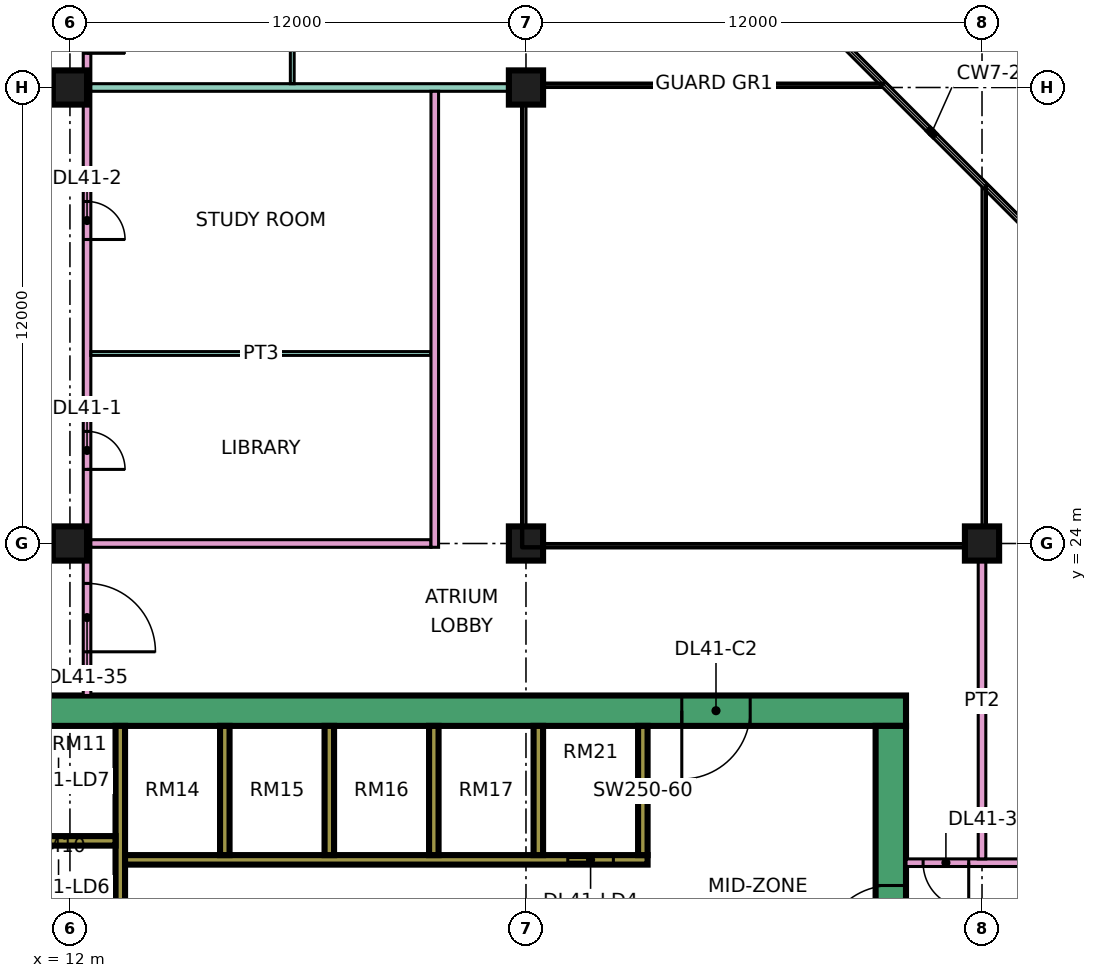
"""IFC4 building model, lengths in metres.
Left out: names, types, materials, properties, quantities, classifications, styles, units other than length and angle.
Written with IfcOpenShell. Run it as: python <this file> out.ifc"""

import sys

from ifc_helpers import new_model, si_unit, direction, frame, frame_2d, origin, origin_2d, place, context, subcontext, project, spatial, rectangle, extrude, element, fill, save


model = new_model("IFC4")
c1 = context("Model", 3, precision=1e-05, world=origin(), true_north=direction((0.0, 1.0)))
c2 = subcontext(c1, "Body", "Model", "MODEL_VIEW")
j1 = project(units=[si_unit("LENGTHUNIT", "METRE"), si_unit("PLANEANGLEUNIT", "RADIAN")], contexts=[c1])
p1 = place(None, origin())
s1 = spatial("IfcSite", under=j1, at=p1, CompositionType="ELEMENT")
p2 = place(p1, origin())
s2 = spatial("IfcBuilding", under=s1, at=p2, CompositionType="ELEMENT")
p3 = place(p2, frame((0.0, 0.0, 179.9)))
s3 = spatial("IfcBuildingStorey", under=s2, at=p3, CompositionType="ELEMENT", Elevation=179.9)
for number, where, z_axis, x_axis in (
    (1, (12.0, 24.0, 0.0), (0.0, 0.0, 1.0), (1.0, 0.0, 0.0)),
    (2, (12.0, 36.0, 0.0), (0.0, 0.0, 1.0), (1.0, 0.0, 0.0)),
    (3, (24.0, 24.0, 0.0), (0.0, 0.0, 1.0), (1.0, 0.0, 0.0)),
    (4, (24.0, 36.0, 0.0), (0.0, 0.0, 1.0), (1.0, 0.0, 0.0)),
    (5, (36.0, 24.0, 0.0), (0.0, 0.0, 1.0), (1.0, 0.0, 0.0)),
):
    element("IfcColumn", number, at=place(p3, frame(where, z_axis=z_axis, x_axis=x_axis)), inside=s3, PredefinedType="COLUMN", context=c2, shape_type="SweptSolid", body=[
        extrude(rectangle(XDim=0.9, YDim=0.9, at=origin_2d()), origin(), (0.0, 0.0, 1.0), 3.75),
    ])
p4 = place(p3, frame((9.0, 19.6, 0.0), z_axis=(0.0, 0.0, 1.0), x_axis=(1.0, 0.0, 0.0)))
e6 = element("IfcWall", 6, at=p4, inside=s3, PredefinedType="SHEAR", context=c2, shape_type="SweptSolid", body=[
    extrude(rectangle(XDim=25.0, YDim=0.8, at=frame_2d((12.5, 0.0))), origin(), (0.0, 0.0, 1.0), 3.75),
])
p5 = place(p4, frame((19.1, 0.0, 0.0)))
e7 = element("IfcOpeningElement", 7, at=p5, cuts=e6, PredefinedType="OPENING", context=c2, shape_type="SweptSolid", body=[
    extrude(rectangle(XDim=1.8, YDim=2.4, at=frame_2d((0.9, 1.2))), frame((0.0, 0.41, 0.0), z_axis=(0.0, -1.0, 0.0), x_axis=(1.0, 0.0, 0.0)), (0.0, 0.0, 1.0), 0.82),
])
p6 = place(p3, frame((33.6, 7.8, 0.0), z_axis=(0.0, 0.0, 1.0), x_axis=(0.0, 1.0, 0.0)))
e8 = element("IfcWall", 8, at=p6, inside=s3, PredefinedType="SHEAR", context=c2, shape_type="SweptSolid", body=[
    extrude(rectangle(XDim=11.4, YDim=0.8, at=frame_2d((5.7, 0.0))), origin(), (0.0, 0.0, 1.0), 3.75),
])
p7 = place(p6, frame((5.4, 0.0, 0.0)))
e9 = element("IfcOpeningElement", 9, at=p7, cuts=e8, PredefinedType="OPENING", context=c2, shape_type="SweptSolid", body=[
    extrude(rectangle(XDim=1.8, YDim=2.4, at=frame_2d((0.9, 1.2))), frame((0.0, 0.41, 0.0), z_axis=(0.0, -1.0, 0.0), x_axis=(1.0, 0.0, 0.0)), (0.0, 0.0, 1.0), 0.82),
])
p8 = place(p3, frame((13.325, 7.8, 0.0), z_axis=(0.0, 0.0, 1.0), x_axis=(0.0, 1.0, 0.0)))
e10 = element("IfcWall", 10, at=p8, inside=s3, PredefinedType="SHEAR", context=c2, shape_type="SweptSolid", body=[
    extrude(rectangle(XDim=11.4, YDim=0.25, at=frame_2d((5.7, 0.0))), origin(), (0.0, 0.0, 1.0), 3.75),
])
p9 = place(p3, frame((13.45, 15.675, 0.0), z_axis=(0.0, 0.0, 1.0), x_axis=(1.0, 0.0, 0.0)))
e11 = element("IfcWall", 11, at=p9, inside=s3, PredefinedType="SHEAR", context=c2, shape_type="SweptSolid", body=[
    extrude(rectangle(XDim=13.75, YDim=0.25, at=frame_2d((6.875, 0.0))), origin(), (0.0, 0.0, 1.0), 3.75),
])
p10 = place(p9, frame((11.65, 0.0, 0.0)))
e12 = element("IfcOpeningElement", 12, at=p10, cuts=e11, PredefinedType="OPENING", context=c2, shape_type="SweptSolid", body=[
    extrude(rectangle(XDim=1.2, YDim=2.2, at=frame_2d((0.6, 1.1))), frame((0.0, 0.135, 0.0), z_axis=(0.0, -1.0, 0.0), x_axis=(1.0, 0.0, 0.0)), (0.0, 0.0, 1.0), 0.27),
])
p11 = place(p3, frame((10.2, 16.175, 0.0), z_axis=(0.0, 0.0, 1.0), x_axis=(1.0, 0.0, 0.0)))
e13 = element("IfcWall", 13, at=p11, inside=s3, PredefinedType="SHEAR", context=c2, shape_type="SweptSolid", body=[
    extrude(rectangle(XDim=3.0, YDim=0.25, at=frame_2d((1.5, 0.0))), origin(), (0.0, 0.0, 1.0), 3.75),
])
for number, where, z_axis, x_axis in (
    (14, (16.075, 15.8, 0.0), (0.0, 0.0, 1.0), (0.0, 1.0, 0.0)),
    (15, (18.825, 15.8, 0.0), (0.0, 0.0, 1.0), (0.0, 1.0, 0.0)),
    (16, (21.575, 15.8, 0.0), (0.0, 0.0, 1.0), (0.0, 1.0, 0.0)),
    (17, (24.325, 15.8, 0.0), (0.0, 0.0, 1.0), (0.0, 1.0, 0.0)),
    (18, (27.075, 15.8, 0.0), (0.0, 0.0, 1.0), (0.0, 1.0, 0.0)),
):
    element("IfcWall", number, at=place(p3, frame(where, z_axis=z_axis, x_axis=x_axis)), inside=s3, PredefinedType="SHEAR", context=c2, shape_type="SweptSolid", body=[
        extrude(rectangle(XDim=3.4, YDim=0.25, at=frame_2d((1.7, 0.0))), origin(), (0.0, 0.0, 1.0), 3.75),
    ])
p12 = place(p3, frame((12.45, 20.0, 0.0), z_axis=(0.0, 0.0, 1.0), x_axis=(0.0, 1.0, 0.0)))
e19 = element("IfcWall", 19, at=p12, inside=s3, PredefinedType="PARTITIONING", context=c2, shape_type="SweptSolid", body=[
    extrude(rectangle(XDim=42.926, YDim=0.2, at=frame_2d((21.463, 0.0))), origin(), (0.0, 0.0, 1.0), 3.35),
])
p13 = place(p12, frame((5.95, 0.0, 0.0)))
e20 = element("IfcOpeningElement", 20, at=p13, cuts=e19, PredefinedType="OPENING", context=c2, shape_type="SweptSolid", body=[
    extrude(rectangle(XDim=1.0, YDim=2.1, at=frame_2d((0.5, 1.05))), frame((0.0, 0.11, 0.0), z_axis=(0.0, -1.0, 0.0), x_axis=(1.0, 0.0, 0.0)), (0.0, 0.0, 1.0), 0.22),
])
p14 = place(p12, frame((12.0, 0.0, 0.0)))
e21 = element("IfcOpeningElement", 21, at=p14, cuts=e19, PredefinedType="OPENING", context=c2, shape_type="SweptSolid", body=[
    extrude(rectangle(XDim=1.0, YDim=2.1, at=frame_2d((0.5, 1.05))), frame((0.0, 0.11, 0.0), z_axis=(0.0, -1.0, 0.0), x_axis=(1.0, 0.0, 0.0)), (0.0, 0.0, 1.0), 0.22),
])
p15 = place(p12, frame((16.9, 0.0, 0.0)))
e22 = element("IfcOpeningElement", 22, at=p15, cuts=e19, PredefinedType="OPENING", context=c2, shape_type="SweptSolid", body=[
    extrude(rectangle(XDim=1.0, YDim=2.1, at=frame_2d((0.5, 1.05))), frame((0.0, 0.11, 0.0), z_axis=(0.0, -1.0, 0.0), x_axis=(1.0, 0.0, 0.0)), (0.0, 0.0, 1.0), 0.22),
])
p16 = place(p12, frame((34.9, 0.0, 0.0)))
e23 = element("IfcOpeningElement", 23, at=p16, cuts=e19, PredefinedType="OPENING", context=c2, shape_type="SweptSolid", body=[
    extrude(rectangle(XDim=1.0, YDim=2.1, at=frame_2d((0.5, 1.05))), frame((0.0, 0.11, 0.0), z_axis=(0.0, -1.0, 0.0), x_axis=(1.0, 0.0, 0.0)), (0.0, 0.0, 1.0), 0.22),
])
p17 = place(p12, frame((1.15, 0.0, 0.0)))
e24 = element("IfcOpeningElement", 24, at=p17, cuts=e19, PredefinedType="OPENING", context=c2, shape_type="SweptSolid", body=[
    extrude(rectangle(XDim=1.8, YDim=2.1, at=frame_2d((0.9, 1.05))), frame((0.0, 0.11, 0.0), z_axis=(0.0, -1.0, 0.0), x_axis=(1.0, 0.0, 0.0)), (0.0, 0.0, 1.0), 0.22),
])
p18 = place(p12, frame((28.6, 0.0, 0.0)))
e25 = element("IfcOpeningElement", 25, at=p18, cuts=e19, PredefinedType="OPENING", context=c2, shape_type="SweptSolid", body=[
    extrude(rectangle(XDim=1.8, YDim=2.1, at=frame_2d((0.9, 1.05))), frame((0.0, 0.11, 0.0), z_axis=(0.0, -1.0, 0.0), x_axis=(1.0, 0.0, 0.0)), (0.0, 0.0, 1.0), 0.22),
])
p19 = place(p3, frame((12.55, 24.0, 0.0), z_axis=(0.0, 0.0, 1.0), x_axis=(1.0, 0.0, 0.0)))
e26 = element("IfcWall", 26, at=p19, inside=s3, PredefinedType="PARTITIONING", context=c2, shape_type="SweptSolid", body=[
    extrude(rectangle(XDim=8.95, YDim=0.2, at=frame_2d((4.475, 0.0))), origin(), (0.0, 0.0, 1.0), 3.35),
])
p20 = place(p3, frame((12.55, 29.0, 0.0), z_axis=(0.0, 0.0, 1.0), x_axis=(1.0, 0.0, 0.0)))
e27 = element("IfcWall", 27, at=p20, inside=s3, PredefinedType="PARTITIONING", context=c2, shape_type="SweptSolid", body=[
    extrude(rectangle(XDim=8.95, YDim=0.1, at=frame_2d((4.475, 0.0))), origin(), (0.0, 0.0, 1.0), 3.35),
])
p21 = place(p3, frame((12.55, 36.0, 0.0), z_axis=(0.0, 0.0, 1.0), x_axis=(1.0, 0.0, 0.0)))
e28 = element("IfcWall", 28, at=p21, inside=s3, PredefinedType="PARTITIONING", context=c2, shape_type="SweptSolid", body=[
    extrude(rectangle(XDim=11.45, YDim=0.2, at=frame_2d((5.725, 0.0))), origin(), (0.0, 0.0, 1.0), 3.35),
])
p22 = place(p3, frame((17.85, 36.1, 0.0), z_axis=(0.0, 0.0, 1.0), x_axis=(0.0, 1.0, 0.0)))
e29 = element("IfcWall", 29, at=p22, inside=s3, PredefinedType="PARTITIONING", context=c2, shape_type="SweptSolid", body=[
    extrude(rectangle(XDim=2.85, YDim=0.1, at=frame_2d((1.425, 0.0))), origin(), (0.0, 0.0, 1.0), 3.35),
])
p23 = place(p22, frame((0.95, 0.0, 0.0)))
e30 = element("IfcOpeningElement", 30, at=p23, cuts=e29, PredefinedType="OPENING", context=c2, shape_type="SweptSolid", body=[
    extrude(rectangle(XDim=0.9, YDim=2.1, at=frame_2d((0.45, 1.05))), frame((0.0, 0.06, 0.0), z_axis=(0.0, -1.0, 0.0), x_axis=(1.0, 0.0, 0.0)), (0.0, 0.0, 1.0), 0.12),
])
p24 = place(p3, frame((21.6, 23.9, 0.0), z_axis=(0.0, 0.0, 1.0), x_axis=(0.0, 1.0, 0.0)))
e31 = element("IfcWall", 31, at=p24, inside=s3, PredefinedType="PARTITIONING", context=c2, shape_type="SweptSolid", body=[
    extrude(rectangle(XDim=12.0, YDim=0.2, at=frame_2d((6.0, 0.0))), origin(), (0.0, 0.0, 1.0), 3.35),
])
p25 = place(p3, frame((34.0, 15.6, 0.0), z_axis=(0.0, 0.0, 1.0), x_axis=(1.0, 0.0, 0.0)))
e32 = element("IfcWall", 32, at=p25, inside=s3, PredefinedType="PARTITIONING", context=c2, shape_type="SweptSolid", body=[
    extrude(rectangle(XDim=10.35, YDim=0.2, at=frame_2d((5.175, 0.0))), origin(), (0.0, 0.0, 1.0), 3.35),
])
p26 = place(p25, frame((5.6, 0.0, 0.0)))
e33 = element("IfcOpeningElement", 33, at=p26, cuts=e32, PredefinedType="OPENING", context=c2, shape_type="SweptSolid", body=[
    extrude(rectangle(XDim=1.0, YDim=2.1, at=frame_2d((0.5, 1.05))), frame((0.0, 0.11, 0.0), z_axis=(0.0, -1.0, 0.0), x_axis=(1.0, 0.0, 0.0)), (0.0, 0.0, 1.0), 0.22),
])
p27 = place(p25, frame((0.45, 0.0, 0.0)))
e34 = element("IfcOpeningElement", 34, at=p27, cuts=e32, PredefinedType="OPENING", context=c2, shape_type="SweptSolid", body=[
    extrude(rectangle(XDim=1.2, YDim=2.1, at=frame_2d((0.6, 1.05))), frame((0.0, 0.11, 0.0), z_axis=(0.0, -1.0, 0.0), x_axis=(1.0, 0.0, 0.0)), (0.0, 0.0, 1.0), 0.22),
])
p28 = place(p3, frame((36.0, 15.7, 0.0), z_axis=(0.0, 0.0, 1.0), x_axis=(0.0, 1.0, 0.0)))
e35 = element("IfcWall", 35, at=p28, inside=s3, PredefinedType="PARTITIONING", context=c2, shape_type="SweptSolid", body=[
    extrude(rectangle(XDim=8.3, YDim=0.2, at=frame_2d((4.15, 0.0))), origin(), (0.0, 0.0, 1.0), 3.35),
])
p29 = place(p10, origin())
e36 = element("IfcDoor", 36, at=p29, inside=s3, OperationType="DOUBLE_DOOR_SLIDING", PredefinedType="DOOR", context=c2, shape_type="SweptSolid", body=[
    extrude(rectangle(XDim=1.2, YDim=2.2, at=frame_2d((0.6, 1.1))), frame((0.0, 0.025, 0.0), z_axis=(0.0, -1.0, 0.0), x_axis=(1.0, 0.0, 0.0)), (0.0, 0.0, 1.0), 0.05),
])
fill(e12, e36)
p30 = place(p7, origin())
e37 = element("IfcDoor", 37, at=p30, inside=s3, OperationType="DOUBLE_DOOR_SINGLE_SWING", PredefinedType="DOOR", context=c2, shape_type="SweptSolid", body=[
    extrude(rectangle(XDim=1.8, YDim=2.4, at=frame_2d((0.9, 1.2))), frame((0.0, 0.025, 0.0), z_axis=(0.0, -1.0, 0.0), x_axis=(1.0, 0.0, 0.0)), (0.0, 0.0, 1.0), 0.05),
])
fill(e9, e37)
p31 = place(p5, frame((1.8, 0.0, 0.0), z_axis=(0.0, 0.0, 1.0), x_axis=(-1.0, 0.0, 0.0)))
e38 = element("IfcDoor", 38, at=p31, inside=s3, OperationType="DOUBLE_DOOR_SINGLE_SWING", PredefinedType="DOOR", context=c2, shape_type="SweptSolid", body=[
    extrude(rectangle(XDim=1.8, YDim=2.4, at=frame_2d((0.9, 1.2))), frame((0.0, 0.025, 0.0), z_axis=(0.0, -1.0, 0.0), x_axis=(1.0, 0.0, 0.0)), (0.0, 0.0, 1.0), 0.05),
])
fill(e7, e38)
p32 = place(p13, frame((1.0, 0.0, 0.0), z_axis=(0.0, 0.0, 1.0), x_axis=(-1.0, 0.0, 0.0)))
e39 = element("IfcDoor", 39, at=p32, inside=s3, OperationType="SINGLE_SWING_LEFT", PredefinedType="DOOR", context=c2, shape_type="SweptSolid", body=[
    extrude(rectangle(XDim=1.0, YDim=2.1, at=frame_2d((0.5, 1.05))), frame((0.0, 0.025, 0.0), z_axis=(0.0, -1.0, 0.0), x_axis=(1.0, 0.0, 0.0)), (0.0, 0.0, 1.0), 0.05),
])
fill(e20, e39)
p33 = place(p14, frame((1.0, 0.0, 0.0), z_axis=(0.0, 0.0, 1.0), x_axis=(-1.0, 0.0, 0.0)))
e40 = element("IfcDoor", 40, at=p33, inside=s3, OperationType="SINGLE_SWING_LEFT", PredefinedType="DOOR", context=c2, shape_type="SweptSolid", body=[
    extrude(rectangle(XDim=1.0, YDim=2.1, at=frame_2d((0.5, 1.05))), frame((0.0, 0.025, 0.0), z_axis=(0.0, -1.0, 0.0), x_axis=(1.0, 0.0, 0.0)), (0.0, 0.0, 1.0), 0.05),
])
fill(e21, e40)
p34 = place(p15, frame((1.0, 0.0, 0.0), z_axis=(0.0, 0.0, 1.0), x_axis=(-1.0, 0.0, 0.0)))
e41 = element("IfcDoor", 41, at=p34, inside=s3, OperationType="SINGLE_SWING_LEFT", PredefinedType="DOOR", context=c2, shape_type="SweptSolid", body=[
    extrude(rectangle(XDim=1.0, YDim=2.1, at=frame_2d((0.5, 1.05))), frame((0.0, 0.025, 0.0), z_axis=(0.0, -1.0, 0.0), x_axis=(1.0, 0.0, 0.0)), (0.0, 0.0, 1.0), 0.05),
])
fill(e22, e41)
p35 = place(p27, origin())
e42 = element("IfcDoor", 42, at=p35, inside=s3, OperationType="SINGLE_SWING_RIGHT", PredefinedType="DOOR", context=c2, shape_type="SweptSolid", body=[
    extrude(rectangle(XDim=1.2, YDim=2.1, at=frame_2d((0.6, 1.05))), frame((0.0, 0.025, 0.0), z_axis=(0.0, -1.0, 0.0), x_axis=(1.0, 0.0, 0.0)), (0.0, 0.0, 1.0), 0.05),
])
fill(e34, e42)
p36 = place(p17, frame((1.8, 0.0, 0.0), z_axis=(0.0, 0.0, 1.0), x_axis=(-1.0, 0.0, 0.0)))
e43 = element("IfcDoor", 43, at=p36, inside=s3, OperationType="DOUBLE_DOOR_SINGLE_SWING", PredefinedType="DOOR", context=c2, shape_type="SweptSolid", body=[
    extrude(rectangle(XDim=1.8, YDim=2.1, at=frame_2d((0.9, 1.05))), frame((0.0, 0.025, 0.0), z_axis=(0.0, -1.0, 0.0), x_axis=(1.0, 0.0, 0.0)), (0.0, 0.0, 1.0), 0.05),
])
fill(e24, e43)
save(model, sys.argv[1])
